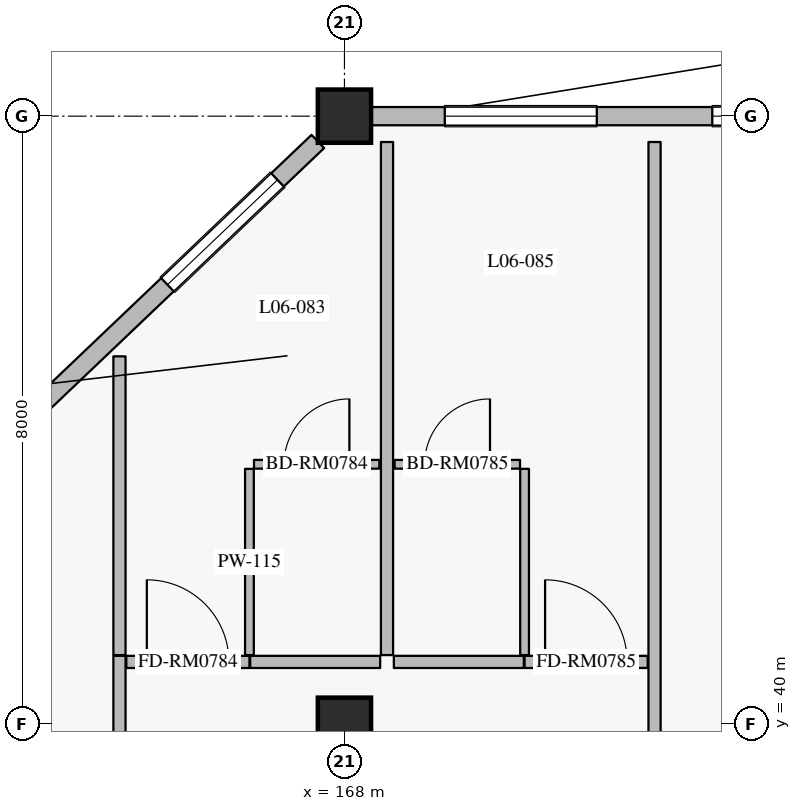
"""IFC4 building model, lengths in metres.
Left out: names, types, materials, properties, quantities, classifications, styles, units other than length and angle.
Written with IfcOpenShell. Run it as: python <this file> out.ifc"""

import sys

from ifc_helpers import new_model, si_unit, direction, frame, frame_2d, origin, origin_2d, place, context, subcontext, project, spatial, rectangle, extrude, element, fill, save


model = new_model("IFC4")
c1 = context("Model", 3, precision=1e-05, world=origin(), true_north=direction((0.0, 1.0)))
c2 = subcontext(c1, "Body", "Model", "MODEL_VIEW")
j1 = project(units=[si_unit("LENGTHUNIT", "METRE"), si_unit("PLANEANGLEUNIT", "RADIAN")], contexts=[c1])
p1 = place(None, origin())
s1 = spatial("IfcSite", under=j1, at=p1, CompositionType="ELEMENT")
p2 = place(p1, origin())
s2 = spatial("IfcBuilding", under=s1, at=p2, CompositionType="ELEMENT")
p3 = place(p2, frame((0.0, 0.0, 28.8)))
s3 = spatial("IfcBuildingStorey", under=s2, at=p3, CompositionType="ELEMENT", Elevation=28.8)
for number, where, z_axis, x_axis in (
    (1, (168.0, 48.0, 0.0), (0.0, 0.0, 1.0), (1.0, 0.0, 0.0)),
    (2, (168.0, 40.0, 0.0), (0.0, 0.0, 1.0), (1.0, 0.0, 0.0)),
):
    element("IfcColumn", number, at=place(p3, frame(where, z_axis=z_axis, x_axis=x_axis)), inside=s3, PredefinedType="COLUMN", context=c2, shape_type="SweptSolid", body=[
        extrude(rectangle(XDim=0.7, YDim=0.7, at=origin_2d()), origin(), (0.0, 0.0, 1.0), 3.6),
    ])
p4 = place(p3, frame((159.95, 40.333, 0.0), z_axis=(0.0, 0.0, 1.0), x_axis=(0.724105170588, 0.689689569247, 0.0)))
e3 = element("IfcWall", 3, at=p4, inside=s3, PredefinedType="SOLIDWALL", context=c2, shape_type="SweptSolid", body=[
    extrude(rectangle(XDim=10.634, YDim=0.24, at=frame_2d((5.317, 0.0))), origin(), (0.0, 0.0, 1.0), 2.93),
])
p5 = place(p4, frame((0.215, 0.0, 0.8)))
e4 = element("IfcOpeningElement", 4, at=p5, cuts=e3, PredefinedType="OPENING", context=c2, shape_type="SweptSolid", body=[
    extrude(rectangle(XDim=1.6, YDim=1.6, at=frame_2d((0.8, 0.8))), frame((0.0, 0.13, 0.0), z_axis=(0.0, -1.0, 0.0), x_axis=(1.0, 0.0, 0.0)), (0.0, 0.0, 1.0), 0.26),
])
p6 = place(p4, frame((3.599, 0.0, 0.8)))
e5 = element("IfcOpeningElement", 5, at=p6, cuts=e3, PredefinedType="OPENING", context=c2, shape_type="SweptSolid", body=[
    extrude(rectangle(XDim=2.0, YDim=1.75, at=frame_2d((1.0, 0.875))), frame((0.0, 0.13, 0.0), z_axis=(0.0, -1.0, 0.0), x_axis=(1.0, 0.0, 0.0)), (0.0, 0.0, 1.0), 0.26),
])
p7 = place(p4, frame((7.901, 0.0, 0.8)))
e6 = element("IfcOpeningElement", 6, at=p7, cuts=e3, PredefinedType="OPENING", context=c2, shape_type="SweptSolid", body=[
    extrude(rectangle(XDim=2.0, YDim=1.75, at=frame_2d((1.0, 0.875))), frame((0.0, 0.13, 0.0), z_axis=(0.0, -1.0, 0.0), x_axis=(1.0, 0.0, 0.0)), (0.0, 0.0, 1.0), 0.26),
])
p8 = place(p3, frame((168.35, 48.0, 0.0), z_axis=(0.0, 0.0, 1.0), x_axis=(1.0, 0.0, 0.0)))
e7 = element("IfcWall", 7, at=p8, inside=s3, PredefinedType="SOLIDWALL", context=c2, shape_type="SweptSolid", body=[
    extrude(rectangle(XDim=7.7, YDim=0.24, at=frame_2d((3.85, 0.0))), origin(), (0.0, 0.0, 1.0), 2.93),
])
p9 = place(p8, frame((0.97, 0.0, 0.8)))
e8 = element("IfcOpeningElement", 8, at=p9, cuts=e7, PredefinedType="OPENING", context=c2, shape_type="SweptSolid", body=[
    extrude(rectangle(XDim=2.0, YDim=1.75, at=frame_2d((1.0, 0.875))), frame((0.0, 0.13, 0.0), z_axis=(0.0, -1.0, 0.0), x_axis=(1.0, 0.0, 0.0)), (0.0, 0.0, 1.0), 0.26),
])
p10 = place(p8, frame((4.49, 0.0, 0.8)))
e9 = element("IfcOpeningElement", 9, at=p10, cuts=e7, PredefinedType="OPENING", context=c2, shape_type="SweptSolid", body=[
    extrude(rectangle(XDim=2.0, YDim=1.75, at=frame_2d((1.0, 0.875))), frame((0.0, 0.13, 0.0), z_axis=(0.0, -1.0, 0.0), x_axis=(1.0, 0.0, 0.0)), (0.0, 0.0, 1.0), 0.26),
])
p11 = place(p3, frame((165.04, 32.26, 0.0), z_axis=(0.0, 0.0, 1.0), x_axis=(0.0, 1.0, 0.0)))
e10 = element("IfcWall", 10, at=p11, inside=s3, PredefinedType="PARTITIONING", context=c2, shape_type="SweptSolid", body=[
    extrude(rectangle(XDim=8.64, YDim=0.16, at=frame_2d((4.32, 0.0))), origin(), (0.0, 0.0, 1.0), 3.365),
])
p12 = place(p3, frame((165.13, 40.82, 0.0), z_axis=(0.0, 0.0, 1.0), x_axis=(1.0, 0.0, 0.0)))
e11 = element("IfcWall", 11, at=p12, inside=s3, PredefinedType="PARTITIONING", context=c2, shape_type="SweptSolid", body=[
    extrude(rectangle(XDim=1.62, YDim=0.16, at=frame_2d((0.81, 0.0))), origin(), (0.0, 0.0, 1.0), 3.365),
])
p13 = place(p12, frame((0.27, 0.0, 0.0)))
e12 = element("IfcOpeningElement", 12, at=p13, cuts=e11, PredefinedType="OPENING", context=c2, shape_type="SweptSolid", body=[
    extrude(rectangle(XDim=1.08, YDim=2.3, at=frame_2d((0.54, 1.15))), frame((0.0, 0.09, 0.0), z_axis=(0.0, -1.0, 0.0), x_axis=(1.0, 0.0, 0.0)), (0.0, 0.0, 1.0), 0.18),
])
p14 = place(p3, frame((166.76, 40.82, 0.0), z_axis=(0.0, 0.0, 1.0), x_axis=(1.0, 0.0, 0.0)))
e13 = element("IfcWall", 13, at=p14, inside=s3, PredefinedType="PARTITIONING", context=c2, shape_type="SweptSolid", body=[
    extrude(rectangle(XDim=1.71, YDim=0.16, at=frame_2d((0.855, 0.0))), origin(), (0.0, 0.0, 1.0), 3.365),
])
p15 = place(p3, frame((166.75, 40.91, 0.0), z_axis=(0.0, 0.0, 1.0), x_axis=(0.0, 1.0, 0.0)))
e14 = element("IfcWall", 14, at=p15, inside=s3, PredefinedType="PARTITIONING", context=c2, shape_type="SweptSolid", body=[
    extrude(rectangle(XDim=2.45, YDim=0.115, at=frame_2d((1.225, 0.0))), origin(), (0.0, 0.0, 1.0), 3.365),
])
p16 = place(p3, frame((166.81, 43.42, 0.0), z_axis=(0.0, 0.0, 1.0), x_axis=(1.0, 0.0, 0.0)))
e15 = element("IfcWall", 15, at=p16, inside=s3, PredefinedType="PARTITIONING", context=c2, shape_type="SweptSolid", body=[
    extrude(rectangle(XDim=1.65, YDim=0.115, at=frame_2d((0.825, 0.0))), origin(), (0.0, 0.0, 1.0), 3.365),
])
p17 = place(p16, frame((0.395, 0.0, 0.0)))
e16 = element("IfcOpeningElement", 16, at=p17, cuts=e15, PredefinedType="OPENING", context=c2, shape_type="SweptSolid", body=[
    extrude(rectangle(XDim=0.86, YDim=2.12, at=frame_2d((0.43, 1.06))), frame((0.0, 0.067, 0.0), z_axis=(0.0, -1.0, 0.0), x_axis=(1.0, 0.0, 0.0)), (0.0, 0.0, 1.0), 0.135),
])
p18 = place(p3, frame((165.04, 40.91, 0.0), z_axis=(0.0, 0.0, 1.0), x_axis=(0.0, 1.0, 0.0)))
e17 = element("IfcWall", 17, at=p18, inside=s3, PredefinedType="PARTITIONING", context=c2, shape_type="SweptSolid", body=[
    extrude(rectangle(XDim=3.93, YDim=0.16, at=frame_2d((1.965, 0.0))), origin(), (0.0, 0.0, 1.0), 3.365),
])
p19 = place(p3, frame((168.65, 40.82, 0.0), z_axis=(0.0, 0.0, 1.0), x_axis=(1.0, 0.0, 0.0)))
e18 = element("IfcWall", 18, at=p19, inside=s3, PredefinedType="PARTITIONING", context=c2, shape_type="SweptSolid", body=[
    extrude(rectangle(XDim=1.71, YDim=0.16, at=frame_2d((0.855, 0.0))), origin(), (0.0, 0.0, 1.0), 3.365),
])
p20 = place(p3, frame((170.37, 40.82, 0.0), z_axis=(0.0, 0.0, 1.0), x_axis=(1.0, 0.0, 0.0)))
e19 = element("IfcWall", 19, at=p20, inside=s3, PredefinedType="PARTITIONING", context=c2, shape_type="SweptSolid", body=[
    extrude(rectangle(XDim=1.62, YDim=0.16, at=frame_2d((0.81, 0.0))), origin(), (0.0, 0.0, 1.0), 3.365),
])
p21 = place(p20, frame((0.27, 0.0, 0.0)))
e20 = element("IfcOpeningElement", 20, at=p21, cuts=e19, PredefinedType="OPENING", context=c2, shape_type="SweptSolid", body=[
    extrude(rectangle(XDim=1.08, YDim=2.3, at=frame_2d((0.54, 1.15))), frame((0.0, 0.09, 0.0), z_axis=(0.0, -1.0, 0.0), x_axis=(1.0, 0.0, 0.0)), (0.0, 0.0, 1.0), 0.18),
])
p22 = place(p3, frame((170.37, 40.91, 0.0), z_axis=(0.0, 0.0, 1.0), x_axis=(0.0, 1.0, 0.0)))
e21 = element("IfcWall", 21, at=p22, inside=s3, PredefinedType="PARTITIONING", context=c2, shape_type="SweptSolid", body=[
    extrude(rectangle(XDim=2.45, YDim=0.115, at=frame_2d((1.225, 0.0))), origin(), (0.0, 0.0, 1.0), 3.365),
])
p23 = place(p3, frame((168.66, 43.42, 0.0), z_axis=(0.0, 0.0, 1.0), x_axis=(1.0, 0.0, 0.0)))
e22 = element("IfcWall", 22, at=p23, inside=s3, PredefinedType="PARTITIONING", context=c2, shape_type="SweptSolid", body=[
    extrude(rectangle(XDim=1.65, YDim=0.115, at=frame_2d((0.825, 0.0))), origin(), (0.0, 0.0, 1.0), 3.365),
])
p24 = place(p23, frame((0.395, 0.0, 0.0)))
e23 = element("IfcOpeningElement", 23, at=p24, cuts=e22, PredefinedType="OPENING", context=c2, shape_type="SweptSolid", body=[
    extrude(rectangle(XDim=0.86, YDim=2.12, at=frame_2d((0.43, 1.06))), frame((0.0, 0.067, 0.0), z_axis=(0.0, -1.0, 0.0), x_axis=(1.0, 0.0, 0.0)), (0.0, 0.0, 1.0), 0.135),
])
p25 = place(p3, frame((168.56, 40.91, 0.0), z_axis=(0.0, 0.0, 1.0), x_axis=(0.0, 1.0, 0.0)))
e24 = element("IfcWall", 24, at=p25, inside=s3, PredefinedType="PARTITIONING", context=c2, shape_type="SweptSolid", body=[
    extrude(rectangle(XDim=6.75, YDim=0.16, at=frame_2d((3.375, 0.0))), origin(), (0.0, 0.0, 1.0), 3.365),
])
p26 = place(p3, frame((172.08, 38.75, 0.0), z_axis=(0.0, 0.0, 1.0), x_axis=(0.0, 1.0, 0.0)))
e25 = element("IfcWall", 25, at=p26, inside=s3, PredefinedType="PARTITIONING", context=c2, shape_type="SweptSolid", body=[
    extrude(rectangle(XDim=8.91, YDim=0.16, at=frame_2d((4.455, 0.0))), origin(), (0.0, 0.0, 1.0), 3.365),
])
p27 = place(p7, origin())
e26 = element("IfcWindow", 26, at=p27, inside=s3, PartitioningType="DOUBLE_PANEL_VERTICAL", PredefinedType="WINDOW", context=c2, shape_type="SweptSolid", body=[
    extrude(rectangle(XDim=2.0, YDim=1.75, at=frame_2d((1.0, 0.875))), frame((0.0, 0.03, 0.0), z_axis=(0.0, -1.0, 0.0), x_axis=(1.0, 0.0, 0.0)), (0.0, 0.0, 1.0), 0.06),
])
fill(e6, e26)
p28 = place(p9, origin())
e27 = element("IfcWindow", 27, at=p28, inside=s3, PartitioningType="DOUBLE_PANEL_VERTICAL", PredefinedType="WINDOW", context=c2, shape_type="SweptSolid", body=[
    extrude(rectangle(XDim=2.0, YDim=1.75, at=frame_2d((1.0, 0.875))), frame((0.0, 0.03, 0.0), z_axis=(0.0, -1.0, 0.0), x_axis=(1.0, 0.0, 0.0)), (0.0, 0.0, 1.0), 0.06),
])
fill(e8, e27)
p29 = place(p10, origin())
e28 = element("IfcWindow", 28, at=p29, inside=s3, PartitioningType="DOUBLE_PANEL_VERTICAL", PredefinedType="WINDOW", context=c2, shape_type="SweptSolid", body=[
    extrude(rectangle(XDim=2.0, YDim=1.75, at=frame_2d((1.0, 0.875))), frame((0.0, 0.03, 0.0), z_axis=(0.0, -1.0, 0.0), x_axis=(1.0, 0.0, 0.0)), (0.0, 0.0, 1.0), 0.06),
])
fill(e9, e28)
p30 = place(p13, origin())
e29 = element("IfcDoor", 29, at=p30, inside=s3, OperationType="SINGLE_SWING_LEFT", PredefinedType="DOOR", context=c2, shape_type="SweptSolid", body=[
    extrude(rectangle(XDim=1.08, YDim=2.3, at=frame_2d((0.54, 1.15))), frame((0.0, 0.025, 0.0), z_axis=(0.0, -1.0, 0.0), x_axis=(1.0, 0.0, 0.0)), (0.0, 0.0, 1.0), 0.05),
])
fill(e12, e29)
p31 = place(p17, origin())
e30 = element("IfcDoor", 30, at=p31, inside=s3, OperationType="SINGLE_SWING_RIGHT", PredefinedType="DOOR", context=c2, shape_type="SweptSolid", body=[
    extrude(rectangle(XDim=0.86, YDim=2.12, at=frame_2d((0.43, 1.06))), frame((0.0, 0.025, 0.0), z_axis=(0.0, -1.0, 0.0), x_axis=(1.0, 0.0, 0.0)), (0.0, 0.0, 1.0), 0.05),
])
fill(e16, e30)
p32 = place(p21, origin())
e31 = element("IfcDoor", 31, at=p32, inside=s3, OperationType="SINGLE_SWING_LEFT", PredefinedType="DOOR", context=c2, shape_type="SweptSolid", body=[
    extrude(rectangle(XDim=1.08, YDim=2.3, at=frame_2d((0.54, 1.15))), frame((0.0, 0.025, 0.0), z_axis=(0.0, -1.0, 0.0), x_axis=(1.0, 0.0, 0.0)), (0.0, 0.0, 1.0), 0.05),
])
fill(e20, e31)
p33 = place(p24, origin())
e32 = element("IfcDoor", 32, at=p33, inside=s3, OperationType="SINGLE_SWING_RIGHT", PredefinedType="DOOR", context=c2, shape_type="SweptSolid", body=[
    extrude(rectangle(XDim=0.86, YDim=2.12, at=frame_2d((0.43, 1.06))), frame((0.0, 0.025, 0.0), z_axis=(0.0, -1.0, 0.0), x_axis=(1.0, 0.0, 0.0)), (0.0, 0.0, 1.0), 0.05),
])
fill(e23, e32)
save(model, sys.argv[1])
